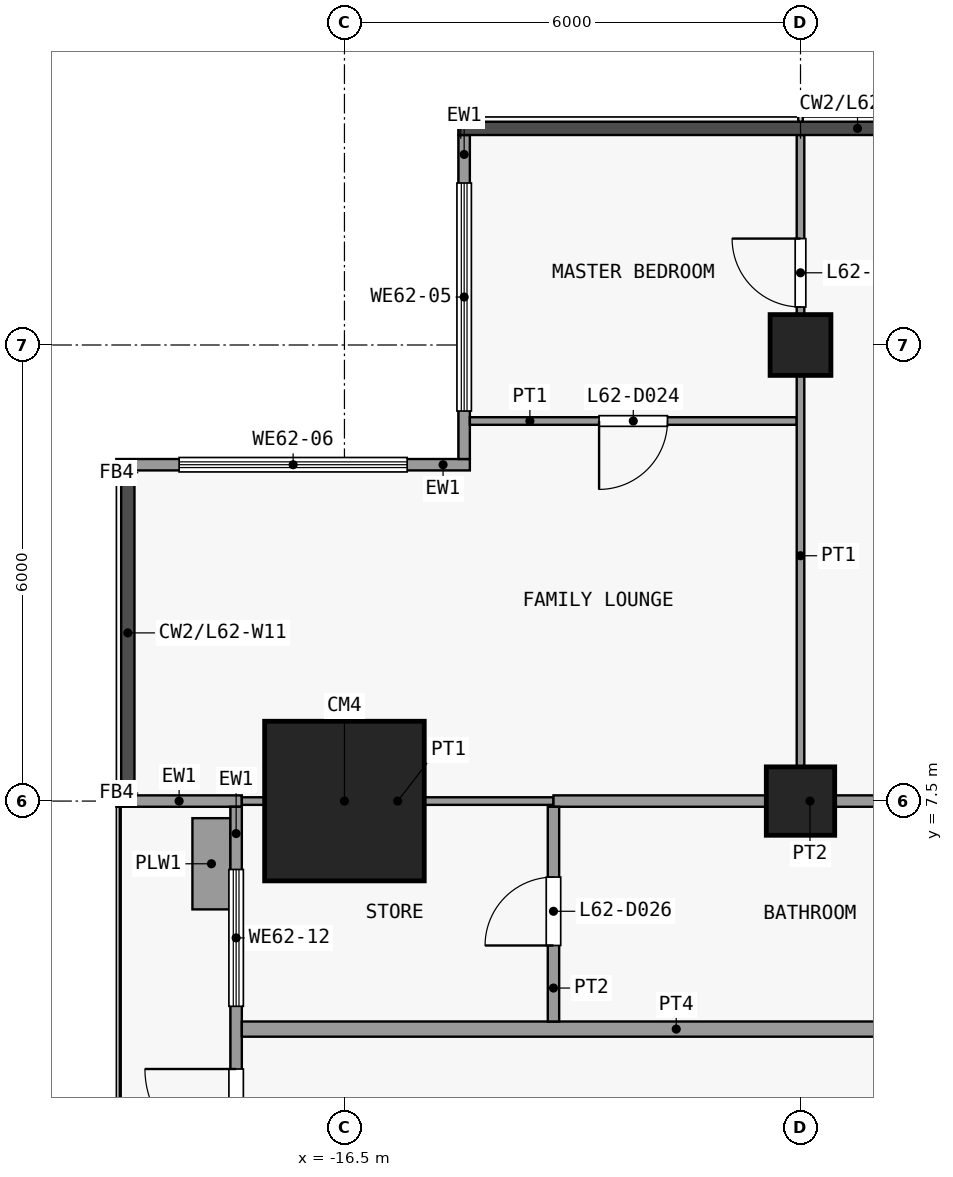
"""IFC4 building model, lengths in metres.
Left out: names, types, materials, properties, quantities, classifications, styles, units other than length and angle.
Written with IfcOpenShell. Run it as: python <this file> out.ifc"""

import sys

from ifc_helpers import new_model, si_unit, direction, frame, frame_2d, origin, origin_2d, place, context, subcontext, project, spatial, rectangle, extrude, element, fill, save


model = new_model("IFC4")
c1 = context("Model", 3, precision=1e-05, world=origin(), true_north=direction((0.0, 1.0)))
c2 = subcontext(c1, "Body", "Model", "MODEL_VIEW")
j1 = project(units=[si_unit("LENGTHUNIT", "METRE"), si_unit("PLANEANGLEUNIT", "RADIAN")], contexts=[c1])
p1 = place(None, origin())
s1 = spatial("IfcSite", under=j1, at=p1, CompositionType="ELEMENT")
p2 = place(p1, origin())
s2 = spatial("IfcBuilding", under=s1, at=p2, CompositionType="ELEMENT")
p3 = place(p2, frame((0.0, 0.0, 244.7)))
s3 = spatial("IfcBuildingStorey", under=s2, at=p3, CompositionType="ELEMENT", Elevation=244.7)
p4 = place(p3, frame((-16.5, 7.5, 0.0), z_axis=(0.0, 0.0, 1.0), x_axis=(1.0, 0.0, 0.0)))
e1 = element("IfcColumn", 1, at=p4, inside=s3, PredefinedType="COLUMN", context=c2, shape_type="SweptSolid", body=[
    extrude(rectangle(XDim=2.1, YDim=2.1, at=origin_2d()), origin(), (0.0, 0.0, 1.0), 3.6),
])
p5 = place(p3, frame((-10.5, 7.5, 0.0), z_axis=(0.0, 0.0, 1.0), x_axis=(1.0, 0.0, 0.0)))
e2 = element("IfcColumn", 2, at=p5, inside=s3, PredefinedType="COLUMN", context=c2, shape_type="SweptSolid", body=[
    extrude(rectangle(XDim=0.9, YDim=0.9, at=origin_2d()), origin(), (0.0, 0.0, 1.0), 3.6),
])
p6 = place(p3, frame((-10.5, 13.5, 0.0), z_axis=(0.0, 0.0, 1.0), x_axis=(1.0, 0.0, 0.0)))
e3 = element("IfcColumn", 3, at=p6, inside=s3, PredefinedType="COLUMN", context=c2, shape_type="SweptSolid", body=[
    extrude(rectangle(XDim=0.8, YDim=0.8, at=origin_2d()), origin(), (0.0, 0.0, 1.0), 3.6),
])
p7 = place(p3, frame((-14.925, 12.0, 0.0), z_axis=(0.0, 0.0, 1.0), x_axis=(0.0, 1.0, 0.0)))
e4 = element("IfcWall", 4, at=p7, inside=s3, PredefinedType="SOLIDWALL", context=c2, shape_type="SweptSolid", body=[
    extrude(rectangle(XDim=4.262, YDim=0.15, at=frame_2d((2.131, 0.0))), origin(), (0.0, 0.0, 1.0), 3.15),
])
p8 = place(p7, frame((0.631, 0.0, 0.9)))
e5 = element("IfcOpeningElement", 5, at=p8, cuts=e4, PredefinedType="OPENING", context=c2, shape_type="SweptSolid", body=[
    extrude(rectangle(XDim=3.0, YDim=2.4, at=frame_2d((1.5, 1.2))), frame((0.0, 0.085, 0.0), z_axis=(0.0, -1.0, 0.0), x_axis=(1.0, 0.0, 0.0)), (0.0, 0.0, 1.0), 0.17),
])
p9 = place(p3, frame((-19.5, 11.925, 0.0), z_axis=(0.0, 0.0, 1.0), x_axis=(1.0, 0.0, 0.0)))
e6 = element("IfcWall", 6, at=p9, inside=s3, PredefinedType="SOLIDWALL", context=c2, shape_type="SweptSolid", body=[
    extrude(rectangle(XDim=4.65, YDim=0.15, at=frame_2d((2.325, 0.0))), origin(), (0.0, 0.0, 1.0), 3.15),
])
p10 = place(p9, frame((0.825, 0.0, 0.9)))
e7 = element("IfcOpeningElement", 7, at=p10, cuts=e6, PredefinedType="OPENING", context=c2, shape_type="SweptSolid", body=[
    extrude(rectangle(XDim=3.0, YDim=2.4, at=frame_2d((1.5, 1.2))), frame((0.0, 0.085, 0.0), z_axis=(0.0, -1.0, 0.0), x_axis=(1.0, 0.0, 0.0)), (0.0, 0.0, 1.0), 0.17),
])
p11 = place(p3, frame((-17.85, 7.5, 0.0), z_axis=(0.0, 0.0, 1.0), x_axis=(-1.0, 0.0, 0.0)))
e8 = element("IfcWall", 8, at=p11, inside=s3, PredefinedType="SOLIDWALL", context=c2, shape_type="SweptSolid", body=[
    extrude(rectangle(XDim=1.65, YDim=0.15, at=frame_2d((0.825, 0.0))), origin(), (0.0, 0.0, 1.0), 3.15),
])
p12 = place(p3, frame((-17.925, 1.575, 0.0), z_axis=(0.0, 0.0, 1.0), x_axis=(0.0, 1.0, 0.0)))
e9 = element("IfcWall", 9, at=p12, inside=s3, PredefinedType="SOLIDWALL", context=c2, shape_type="SweptSolid", body=[
    extrude(rectangle(XDim=5.85, YDim=0.15, at=frame_2d((2.925, 0.0))), origin(), (0.0, 0.0, 1.0), 3.15),
])
p13 = place(p12, frame((1.2, 0.0, 0.0)))
e10 = element("IfcOpeningElement", 10, at=p13, cuts=e9, PredefinedType="OPENING", context=c2, shape_type="SweptSolid", body=[
    extrude(rectangle(XDim=1.2, YDim=2.4, at=frame_2d((0.6, 1.2))), frame((0.0, 0.085, 0.0), z_axis=(0.0, -1.0, 0.0), x_axis=(1.0, 0.0, 0.0)), (0.0, 0.0, 1.0), 0.17),
])
p14 = place(p12, frame((0.25, 0.0, 0.9)))
e11 = element("IfcOpeningElement", 11, at=p14, cuts=e9, PredefinedType="OPENING", context=c2, shape_type="SweptSolid", body=[
    extrude(rectangle(XDim=0.7, YDim=2.1, at=frame_2d((0.35, 1.05))), frame((0.0, 0.085, 0.0), z_axis=(0.0, -1.0, 0.0), x_axis=(1.0, 0.0, 0.0)), (0.0, 0.0, 1.0), 0.17),
])
p15 = place(p12, frame((3.225, 0.0, 0.9)))
e12 = element("IfcOpeningElement", 12, at=p15, cuts=e9, PredefinedType="OPENING", context=c2, shape_type="SweptSolid", body=[
    extrude(rectangle(XDim=1.8, YDim=2.1, at=frame_2d((0.9, 1.05))), frame((0.0, 0.085, 0.0), z_axis=(0.0, -1.0, 0.0), x_axis=(1.0, 0.0, 0.0)), (0.0, 0.0, 1.0), 0.17),
])
p16 = place(p3, frame((-18.25, 6.075, 0.0), z_axis=(0.0, 0.0, 1.0), x_axis=(0.0, 1.0, 0.0)))
e13 = element("IfcWall", 13, at=p16, inside=s3, PredefinedType="USERDEFINED", context=c2, shape_type="SweptSolid", body=[
    extrude(rectangle(XDim=1.2, YDim=0.5, at=frame_2d((0.6, 0.0))), origin(), (0.0, 0.0, 1.0), 0.9),
])
p17 = place(p3, frame((-17.85, 4.5, 0.0), z_axis=(0.0, 0.0, 1.0), x_axis=(1.0, 0.0, 0.0)))
e14 = element("IfcWall", 14, at=p17, inside=s3, PredefinedType="PARTITIONING", context=c2, shape_type="SweptSolid", body=[
    extrude(rectangle(XDim=37.2, YDim=0.2, at=frame_2d((18.6, 0.0))), origin(), (0.0, 0.0, 1.0), 3.15),
])
p18 = place(p17, frame((11.55, 0.0, 0.0)))
e15 = element("IfcOpeningElement", 15, at=p18, cuts=e14, PredefinedType="OPENING", context=c2, shape_type="SweptSolid", body=[
    extrude(rectangle(XDim=1.0, YDim=2.1, at=frame_2d((0.5, 1.05))), frame((0.0, 0.11, 0.0), z_axis=(0.0, -1.0, 0.0), x_axis=(1.0, 0.0, 0.0)), (0.0, 0.0, 1.0), 0.22),
])
p19 = place(p17, frame((23.05, 0.0, 0.0)))
e16 = element("IfcOpeningElement", 16, at=p19, cuts=e14, PredefinedType="OPENING", context=c2, shape_type="SweptSolid", body=[
    extrude(rectangle(XDim=1.0, YDim=2.1, at=frame_2d((0.5, 1.05))), frame((0.0, 0.11, 0.0), z_axis=(0.0, -1.0, 0.0), x_axis=(1.0, 0.0, 0.0)), (0.0, 0.0, 1.0), 0.22),
])
p20 = place(p17, frame((31.55, 0.0, 0.0)))
e17 = element("IfcOpeningElement", 17, at=p20, cuts=e14, PredefinedType="OPENING", context=c2, shape_type="SweptSolid", body=[
    extrude(rectangle(XDim=1.0, YDim=2.1, at=frame_2d((0.5, 1.05))), frame((0.0, 0.11, 0.0), z_axis=(0.0, -1.0, 0.0), x_axis=(1.0, 0.0, 0.0)), (0.0, 0.0, 1.0), 0.22),
])
p21 = place(p3, frame((-17.85, 7.5, 0.0), z_axis=(0.0, 0.0, 1.0), x_axis=(1.0, 0.0, 0.0)))
e18 = element("IfcWall", 18, at=p21, inside=s3, PredefinedType="PARTITIONING", context=c2, shape_type="SweptSolid", body=[
    extrude(rectangle(XDim=4.1, YDim=0.1, at=frame_2d((2.05, 0.0))), origin(), (0.0, 0.0, 1.0), 3.15),
])
p22 = place(p3, frame((-13.75, 7.5, 0.0), z_axis=(0.0, 0.0, 1.0), x_axis=(1.0, 0.0, 0.0)))
e19 = element("IfcWall", 19, at=p22, inside=s3, PredefinedType="PARTITIONING", context=c2, shape_type="SweptSolid", body=[
    extrude(rectangle(XDim=6.75, YDim=0.15, at=frame_2d((3.375, 0.0))), origin(), (0.0, 0.0, 1.0), 3.15),
])
p23 = place(p3, frame((-14.85, 12.5, 0.0), z_axis=(0.0, 0.0, 1.0), x_axis=(1.0, 0.0, 0.0)))
e20 = element("IfcWall", 20, at=p23, inside=s3, PredefinedType="PARTITIONING", context=c2, shape_type="SweptSolid", body=[
    extrude(rectangle(XDim=4.3, YDim=0.1, at=frame_2d((2.15, 0.0))), origin(), (0.0, 0.0, 1.0), 3.15),
])
p24 = place(p23, frame((1.7, 0.0, 0.0)))
e21 = element("IfcOpeningElement", 21, at=p24, cuts=e20, PredefinedType="OPENING", context=c2, shape_type="SweptSolid", body=[
    extrude(rectangle(XDim=0.9, YDim=2.1, at=frame_2d((0.45, 1.05))), frame((0.0, 0.06, 0.0), z_axis=(0.0, -1.0, 0.0), x_axis=(1.0, 0.0, 0.0)), (0.0, 0.0, 1.0), 0.12),
])
p25 = place(p3, frame((-13.75, 4.6, 0.0), z_axis=(0.0, 0.0, 1.0), x_axis=(0.0, 1.0, 0.0)))
e22 = element("IfcWall", 22, at=p25, inside=s3, PredefinedType="PARTITIONING", context=c2, shape_type="SweptSolid", body=[
    extrude(rectangle(XDim=2.825, YDim=0.15, at=frame_2d((1.413, 0.0))), origin(), (0.0, 0.0, 1.0), 3.15),
])
p26 = place(p25, frame((1.0, 0.0, 0.0)))
e23 = element("IfcOpeningElement", 23, at=p26, cuts=e22, PredefinedType="OPENING", context=c2, shape_type="SweptSolid", body=[
    extrude(rectangle(XDim=0.9, YDim=2.1, at=frame_2d((0.45, 1.05))), frame((0.0, 0.085, 0.0), z_axis=(0.0, -1.0, 0.0), x_axis=(1.0, 0.0, 0.0)), (0.0, 0.0, 1.0), 0.17),
])
p27 = place(p3, frame((-10.5, 7.575, 0.0), z_axis=(0.0, 0.0, 1.0), x_axis=(0.0, 1.0, 0.0)))
e24 = element("IfcWall", 24, at=p27, inside=s3, PredefinedType="PARTITIONING", context=c2, shape_type="SweptSolid", body=[
    extrude(rectangle(XDim=8.688, YDim=0.1, at=frame_2d((4.344, 0.0))), origin(), (0.0, 0.0, 1.0), 3.15),
])
p28 = place(p27, frame((6.425, 0.0, 0.0)))
e25 = element("IfcOpeningElement", 25, at=p28, cuts=e24, PredefinedType="OPENING", context=c2, shape_type="SweptSolid", body=[
    extrude(rectangle(XDim=0.9, YDim=2.1, at=frame_2d((0.45, 1.05))), frame((0.0, 0.06, 0.0), z_axis=(0.0, -1.0, 0.0), x_axis=(1.0, 0.0, 0.0)), (0.0, 0.0, 1.0), 0.12),
])
p29 = place(p8, origin())
e26 = element("IfcWindow", 26, at=p29, inside=s3, PartitioningType="SINGLE_PANEL", PredefinedType="WINDOW", context=c2, shape_type="SweptSolid", body=[
    extrude(rectangle(XDim=3.0, YDim=2.4, at=frame_2d((1.5, 1.2))), frame((0.0, 0.03, 0.0), z_axis=(0.0, -1.0, 0.0), x_axis=(1.0, 0.0, 0.0)), (0.0, 0.0, 1.0), 0.06),
])
fill(e5, e26)
p30 = place(p10, origin())
e27 = element("IfcWindow", 27, at=p30, inside=s3, PartitioningType="SINGLE_PANEL", PredefinedType="WINDOW", context=c2, shape_type="SweptSolid", body=[
    extrude(rectangle(XDim=3.0, YDim=2.4, at=frame_2d((1.5, 1.2))), frame((0.0, 0.03, 0.0), z_axis=(0.0, -1.0, 0.0), x_axis=(1.0, 0.0, 0.0)), (0.0, 0.0, 1.0), 0.06),
])
fill(e7, e27)
p31 = place(p13, origin())
e28 = element("IfcDoor", 28, at=p31, inside=s3, OperationType="SINGLE_SWING_RIGHT", PredefinedType="DOOR", context=c2, shape_type="SweptSolid", body=[
    extrude(rectangle(XDim=1.2, YDim=2.4, at=frame_2d((0.6, 1.2))), frame((0.0, 0.025, 0.0), z_axis=(0.0, -1.0, 0.0), x_axis=(1.0, 0.0, 0.0)), (0.0, 0.0, 1.0), 0.05),
])
fill(e10, e28)
p32 = place(p15, origin())
e29 = element("IfcWindow", 29, at=p32, inside=s3, PartitioningType="SINGLE_PANEL", PredefinedType="WINDOW", context=c2, shape_type="SweptSolid", body=[
    extrude(rectangle(XDim=1.8, YDim=2.1, at=frame_2d((0.9, 1.05))), frame((0.0, 0.03, 0.0), z_axis=(0.0, -1.0, 0.0), x_axis=(1.0, 0.0, 0.0)), (0.0, 0.0, 1.0), 0.06),
])
fill(e12, e29)
p33 = place(p24, origin())
e30 = element("IfcDoor", 30, at=p33, inside=s3, OperationType="SINGLE_SWING_LEFT", PredefinedType="DOOR", context=c2, shape_type="SweptSolid", body=[
    extrude(rectangle(XDim=0.9, YDim=2.1, at=frame_2d((0.45, 1.05))), frame((0.0, 0.025, 0.0), z_axis=(0.0, -1.0, 0.0), x_axis=(1.0, 0.0, 0.0)), (0.0, 0.0, 1.0), 0.05),
])
fill(e21, e30)
p34 = place(p26, origin())
e31 = element("IfcDoor", 31, at=p34, inside=s3, OperationType="SINGLE_SWING_RIGHT", PredefinedType="DOOR", context=c2, shape_type="SweptSolid", body=[
    extrude(rectangle(XDim=0.9, YDim=2.1, at=frame_2d((0.45, 1.05))), frame((0.0, 0.025, 0.0), z_axis=(0.0, -1.0, 0.0), x_axis=(1.0, 0.0, 0.0)), (0.0, 0.0, 1.0), 0.05),
])
fill(e23, e31)
p35 = place(p28, origin())
e32 = element("IfcDoor", 32, at=p35, inside=s3, OperationType="SINGLE_SWING_LEFT", PredefinedType="DOOR", context=c2, shape_type="SweptSolid", body=[
    extrude(rectangle(XDim=0.9, YDim=2.1, at=frame_2d((0.45, 1.05))), frame((0.0, 0.025, 0.0), z_axis=(0.0, -1.0, 0.0), x_axis=(1.0, 0.0, 0.0)), (0.0, 0.0, 1.0), 0.05),
])
fill(e25, e32)
save(model, sys.argv[1])
